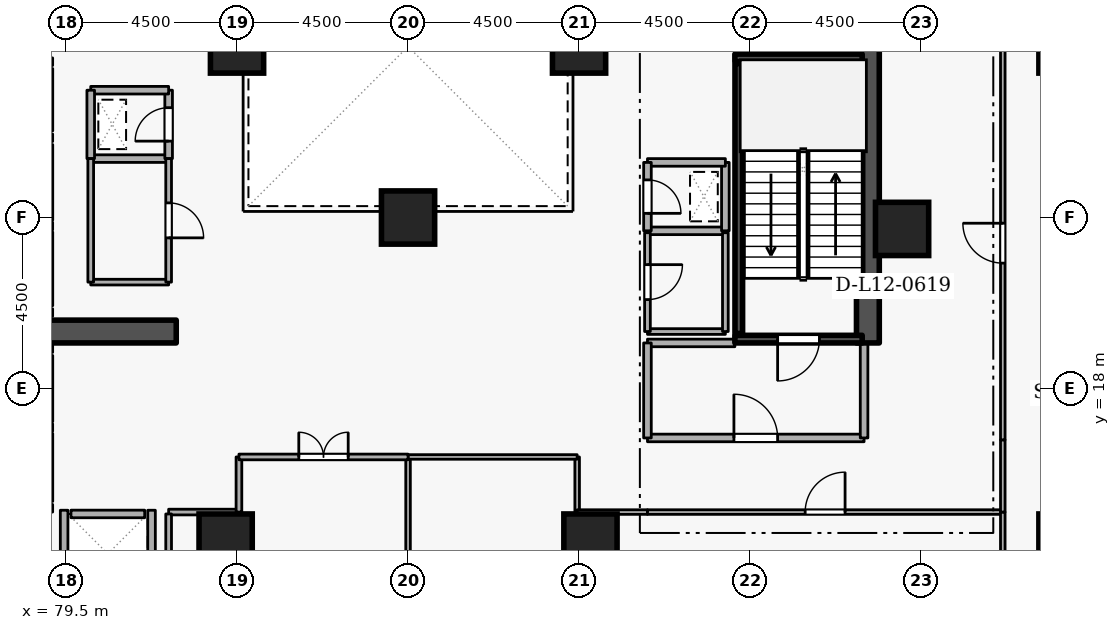
"""IFC4 building model, lengths in metres.
Left out: names, types, materials, properties, quantities, classifications, styles, units other than length and angle.
Written with IfcOpenShell. Run it as: python <this file> out.ifc"""

import sys

from ifc_helpers import new_model, si_unit, direction, frame, frame_2d, origin, origin_2d, place, context, subcontext, project, spatial, rectangle, extrude, element, fill, save


model = new_model("IFC4")
c1 = context("Model", 3, precision=1e-05, world=origin(), true_north=direction((0.0, 1.0)))
c2 = subcontext(c1, "Body", "Model", "MODEL_VIEW")
j1 = project(units=[si_unit("LENGTHUNIT", "METRE"), si_unit("PLANEANGLEUNIT", "RADIAN")], contexts=[c1])
p1 = place(None, origin())
s1 = spatial("IfcSite", under=j1, at=p1, CompositionType="ELEMENT")
p2 = place(p1, origin())
s2 = spatial("IfcBuilding", under=s1, at=p2, CompositionType="ELEMENT")
p3 = place(p2, frame((0.0, 0.0, 49.5)))
s3 = spatial("IfcBuildingStorey", under=s2, at=p3, CompositionType="ELEMENT", Elevation=49.5)
p4 = place(p3, frame((100.6, 19.2, 0.0), z_axis=(0.0, 0.0, 1.0), x_axis=(0.0, 1.0, 0.0)))
e1 = element("IfcWall", 1, at=p4, inside=s3, PredefinedType="SHEAR", context=c2, shape_type="SweptSolid", body=[
    extrude(rectangle(XDim=15.6, YDim=0.6, at=frame_2d((7.8, 0.0))), origin(), (0.0, 0.0, 1.0), 4.2),
])
p5 = place(p3, frame((76.7, 19.5, 0.0), z_axis=(0.0, 0.0, 1.0), x_axis=(1.0, 0.0, 0.0)))
e2 = element("IfcWall", 2, at=p5, inside=s3, PredefinedType="SHEAR", context=c2, shape_type="SweptSolid", body=[
    extrude(rectangle(XDim=5.7, YDim=0.6, at=frame_2d((2.85, 0.0))), origin(), (0.0, 0.0, 1.0), 4.2),
])
for number, where, z_axis, x_axis in (
    (3, (105.8, 14.0, 0.0), (0.0, 0.0, 1.0), (1.0, 0.0, 0.0)),
    (4, (105.8, 27.0, 0.0), (0.0, 0.0, 1.0), (1.0, 0.0, 0.0)),
    (5, (93.3, 14.0, 0.0), (0.0, 0.0, 1.0), (1.0, 0.0, 0.0)),
    (6, (83.7, 14.0, 0.0), (0.0, 0.0, 1.0), (1.0, 0.0, 0.0)),
    (7, (101.5, 22.2, 0.0), (0.0, 0.0, 1.0), (1.0, 0.0, 0.0)),
    (8, (93.0, 27.0, 0.0), (0.0, 0.0, 1.0), (1.0, 0.0, 0.0)),
    (9, (84.0, 27.0, 0.0), (0.0, 0.0, 1.0), (1.0, 0.0, 0.0)),
    (10, (88.5, 22.5, 0.0), (0.0, 0.0, 1.0), (1.0, 0.0, 0.0)),
):
    element("IfcColumn", number, at=place(p3, frame(where, z_axis=z_axis, x_axis=x_axis)), inside=s3, PredefinedType="COLUMN", context=c2, shape_type="SweptSolid", body=[
        extrude(rectangle(XDim=1.4, YDim=1.4, at=origin_2d()), origin(), (0.0, 0.0, 1.0), 4.2),
    ])
p6 = place(p3, frame((79.05, 24.78, 0.0), z_axis=(0.0, 0.0, 1.0), x_axis=(0.0, 1.0, 0.0)))
e11 = element("IfcWall", 11, at=p6, inside=s3, PredefinedType="STANDARD", context=c2, shape_type="SweptSolid", body=[
    extrude(rectangle(XDim=1.64, YDim=0.2, at=frame_2d((0.82, 0.0))), origin(), (0.0, 0.0, 1.0), 3.94),
])
p7 = place(p6, frame((0.31, 0.0, 0.0)))
e12 = element("IfcOpeningElement", 12, at=p7, cuts=e11, PredefinedType="OPENING", context=c2, shape_type="SweptSolid", body=[
    extrude(rectangle(XDim=1.02, YDim=2.06, at=frame_2d((0.51, 1.03))), frame((0.0, 0.11, 0.0), z_axis=(0.0, -1.0, 0.0), x_axis=(1.0, 0.0, 0.0)), (0.0, 0.0, 1.0), 0.22),
])
p8 = place(p3, frame((79.05, 22.43, 0.0), z_axis=(0.0, 0.0, 1.0), x_axis=(0.0, 1.0, 0.0)))
e13 = element("IfcWall", 13, at=p8, inside=s3, PredefinedType="STANDARD", context=c2, shape_type="SweptSolid", body=[
    extrude(rectangle(XDim=1.99, YDim=0.2, at=frame_2d((0.995, 0.0))), origin(), (0.0, 0.0, 1.0), 3.94),
])
p9 = place(p3, frame((79.05, 20.18, 0.0), z_axis=(0.0, 0.0, 1.0), x_axis=(0.0, 1.0, 0.0)))
e14 = element("IfcWall", 14, at=p9, inside=s3, PredefinedType="STANDARD", context=c2, shape_type="SweptSolid", body=[
    extrude(rectangle(XDim=1.94, YDim=0.2, at=frame_2d((0.97, 0.0))), origin(), (0.0, 0.0, 1.0), 3.94),
])
p10 = place(p3, frame((79.05, 17.13, 0.0), z_axis=(0.0, 0.0, 1.0), x_axis=(0.0, 1.0, 0.0)))
e15 = element("IfcWall", 15, at=p10, inside=s3, PredefinedType="STANDARD", context=c2, shape_type="SweptSolid", body=[
    extrude(rectangle(XDim=1.74, YDim=0.2, at=frame_2d((0.87, 0.0))), origin(), (0.0, 0.0, 1.0), 3.94),
])
p11 = place(p3, frame((79.05, 15.03, 0.0), z_axis=(0.0, 0.0, 1.0), x_axis=(0.0, 1.0, 0.0)))
e16 = element("IfcWall", 16, at=p11, inside=s3, PredefinedType="STANDARD", context=c2, shape_type="SweptSolid", body=[
    extrude(rectangle(XDim=1.79, YDim=0.2, at=frame_2d((0.895, 0.0))), origin(), (0.0, 0.0, 1.0), 3.94),
])
p12 = place(p3, frame((79.63, 14.7, 0.0), z_axis=(0.0, 0.0, 1.0), x_axis=(1.0, 0.0, 0.0)))
e17 = element("IfcWall", 17, at=p12, inside=s3, PredefinedType="STANDARD", context=c2, shape_type="SweptSolid", body=[
    extrude(rectangle(XDim=1.94, YDim=0.2, at=frame_2d((0.97, 0.0))), origin(), (0.0, 0.0, 1.0), 3.94),
])
for number, where, z_axis, x_axis in (
    (18, (81.75, 12.612, 0.0), (0.0, 0.0, 1.0), (0.0, 1.0, 0.0)),
    (19, (79.45, 12.612, 0.0), (0.0, 0.0, 1.0), (0.0, 1.0, 0.0)),
):
    element("IfcWall", number, at=place(p3, frame(where, z_axis=z_axis, x_axis=x_axis)), inside=s3, PredefinedType="STANDARD", context=c2, shape_type="SweptSolid", body=[
        extrude(rectangle(XDim=2.186, YDim=0.2, at=frame_2d((1.093, 0.0))), origin(), (0.0, 0.0, 1.0), 3.94),
    ])
p13 = place(p3, frame((100.45, 19.3, 0.0), z_axis=(0.0, 0.0, 1.0), x_axis=(-1.0, 0.0, 0.0)))
e20 = element("IfcWall", 20, at=p13, inside=s3, PredefinedType="SHEAR", context=c2, shape_type="SweptSolid", body=[
    extrude(rectangle(XDim=3.35, YDim=0.2, at=frame_2d((1.675, 0.0))), origin(), (0.0, 0.0, 1.0), 4.2),
])
p14 = place(p13, frame((1.125, 0.0, 0.0)))
e21 = element("IfcOpeningElement", 21, at=p14, cuts=e20, PredefinedType="OPENING", context=c2, shape_type="SweptSolid", body=[
    extrude(rectangle(XDim=1.1, YDim=2.1, at=frame_2d((0.55, 1.05))), frame((0.0, 0.11, 0.0), z_axis=(0.0, -1.0, 0.0), x_axis=(1.0, 0.0, 0.0)), (0.0, 0.0, 1.0), 0.22),
])
p15 = place(p3, frame((97.1, 26.7, 0.0), z_axis=(0.0, 0.0, 1.0), x_axis=(1.0, 0.0, 0.0)))
e22 = element("IfcWall", 22, at=p15, inside=s3, PredefinedType="SHEAR", context=c2, shape_type="SweptSolid", body=[
    extrude(rectangle(XDim=3.35, YDim=0.2, at=frame_2d((1.675, 0.0))), origin(), (0.0, 0.0, 1.0), 4.2),
])
p16 = place(p3, frame((97.203, 26.55, 0.0), z_axis=(0.0, 0.0, 1.0), x_axis=(0.0, -1.0, 0.0)))
e23 = element("IfcWall", 23, at=p16, inside=s3, PredefinedType="SHEAR", context=c2, shape_type="SweptSolid", body=[
    extrude(rectangle(XDim=7.1, YDim=0.2, at=frame_2d((3.55, 0.0))), origin(), (0.0, 0.0, 1.0), 4.2),
])
p17 = place(p3, frame((94.8, 16.7, 0.0), z_axis=(0.0, 0.0, 1.0), x_axis=(1.0, 0.0, 0.0)))
e24 = element("IfcWall", 24, at=p17, inside=s3, PredefinedType="STANDARD", context=c2, shape_type="SweptSolid", body=[
    extrude(rectangle(XDim=5.7, YDim=0.2, at=frame_2d((2.85, 0.0))), origin(), (0.0, 0.0, 1.0), 3.94),
])
p18 = place(p17, frame((2.275, 0.0, 0.0)))
e25 = element("IfcOpeningElement", 25, at=p18, cuts=e24, PredefinedType="OPENING", context=c2, shape_type="SweptSolid", body=[
    extrude(rectangle(XDim=1.15, YDim=2.1, at=frame_2d((0.575, 1.05))), frame((0.0, 0.11, 0.0), z_axis=(0.0, -1.0, 0.0), x_axis=(1.0, 0.0, 0.0)), (0.0, 0.0, 1.0), 0.22),
])
p19 = place(p3, frame((100.5, 16.7, 0.0), z_axis=(0.0, 0.0, 1.0), x_axis=(0.0, 1.0, 0.0)))
e26 = element("IfcWall", 26, at=p19, inside=s3, PredefinedType="STANDARD", context=c2, shape_type="SweptSolid", body=[
    extrude(rectangle(XDim=2.5, YDim=0.2, at=frame_2d((1.25, 0.0))), origin(), (0.0, 0.0, 1.0), 3.94),
])
p20 = place(p3, frame((97.1, 19.2, 0.0), z_axis=(0.0, 0.0, 1.0), x_axis=(-1.0, 0.0, 0.0)))
e27 = element("IfcWall", 27, at=p20, inside=s3, PredefinedType="STANDARD", context=c2, shape_type="SweptSolid", body=[
    extrude(rectangle(XDim=2.3, YDim=0.2, at=frame_2d((1.15, 0.0))), origin(), (0.0, 0.0, 1.0), 3.145),
])
p21 = place(p3, frame((94.8, 19.2, 0.0), z_axis=(0.0, 0.0, 1.0), x_axis=(0.0, -1.0, 0.0)))
e28 = element("IfcWall", 28, at=p21, inside=s3, PredefinedType="STANDARD", context=c2, shape_type="SweptSolid", body=[
    extrude(rectangle(XDim=2.5, YDim=0.2, at=frame_2d((1.25, 0.0))), origin(), (0.0, 0.0, 1.0), 3.94),
])
p22 = place(p3, frame((94.8, 22.15, 0.0), z_axis=(0.0, 0.0, 1.0), x_axis=(1.0, 0.0, 0.0)))
e29 = element("IfcWall", 29, at=p22, inside=s3, PredefinedType="STANDARD", context=c2, shape_type="SweptSolid", body=[
    extrude(rectangle(XDim=2.05, YDim=0.2, at=frame_2d((1.025, 0.0))), origin(), (0.0, 0.0, 1.0), 3.94),
])
p23 = place(p3, frame((96.85, 22.15, 0.0), z_axis=(0.0, 0.0, 1.0), x_axis=(0.0, 1.0, 0.0)))
e30 = element("IfcWall", 30, at=p23, inside=s3, PredefinedType="STANDARD", context=c2, shape_type="SweptSolid", body=[
    extrude(rectangle(XDim=1.8, YDim=0.2, at=frame_2d((0.9, 0.0))), origin(), (0.0, 0.0, 1.0), 3.94),
])
p24 = place(p3, frame((96.85, 23.95, 0.0), z_axis=(0.0, 0.0, 1.0), x_axis=(-1.0, 0.0, 0.0)))
e31 = element("IfcWall", 31, at=p24, inside=s3, PredefinedType="STANDARD", context=c2, shape_type="SweptSolid", body=[
    extrude(rectangle(XDim=2.05, YDim=0.2, at=frame_2d((1.025, 0.0))), origin(), (0.0, 0.0, 1.0), 3.94),
])
p25 = place(p3, frame((94.8, 23.95, 0.0), z_axis=(0.0, 0.0, 1.0), x_axis=(0.0, -1.0, 0.0)))
e32 = element("IfcWall", 32, at=p25, inside=s3, PredefinedType="STANDARD", context=c2, shape_type="SweptSolid", body=[
    extrude(rectangle(XDim=1.8, YDim=0.2, at=frame_2d((0.9, 0.0))), origin(), (0.0, 0.0, 1.0), 3.94),
])
p26 = place(p25, frame((0.46, 0.0, 0.0)))
e33 = element("IfcOpeningElement", 33, at=p26, cuts=e32, PredefinedType="OPENING", context=c2, shape_type="SweptSolid", body=[
    extrude(rectangle(XDim=0.88, YDim=2.04, at=frame_2d((0.44, 1.02))), frame((0.0, 0.11, 0.0), z_axis=(0.0, -1.0, 0.0), x_axis=(1.0, 0.0, 0.0)), (0.0, 0.0, 1.0), 0.22),
])
p27 = place(p3, frame((80.15, 24.05, 0.0), z_axis=(0.0, 0.0, 1.0), x_axis=(1.0, 0.0, 0.0)))
e34 = element("IfcWall", 34, at=p27, inside=s3, PredefinedType="STANDARD", context=c2, shape_type="SweptSolid", body=[
    extrude(rectangle(XDim=2.05, YDim=0.2, at=frame_2d((1.025, 0.0))), origin(), (0.0, 0.0, 1.0), 3.94),
])
p28 = place(p3, frame((82.2, 24.05, 0.0), z_axis=(0.0, 0.0, 1.0), x_axis=(0.0, 1.0, 0.0)))
e35 = element("IfcWall", 35, at=p28, inside=s3, PredefinedType="STANDARD", context=c2, shape_type="SweptSolid", body=[
    extrude(rectangle(XDim=1.8, YDim=0.2, at=frame_2d((0.9, 0.0))), origin(), (0.0, 0.0, 1.0), 3.94),
])
p29 = place(p28, frame((0.46, 0.0, 0.0)))
e36 = element("IfcOpeningElement", 36, at=p29, cuts=e35, PredefinedType="OPENING", context=c2, shape_type="SweptSolid", body=[
    extrude(rectangle(XDim=0.88, YDim=2.04, at=frame_2d((0.44, 1.02))), frame((0.0, 0.11, 0.0), z_axis=(0.0, -1.0, 0.0), x_axis=(1.0, 0.0, 0.0)), (0.0, 0.0, 1.0), 0.22),
])
p30 = place(p3, frame((82.2, 25.85, 0.0), z_axis=(0.0, 0.0, 1.0), x_axis=(-1.0, 0.0, 0.0)))
e37 = element("IfcWall", 37, at=p30, inside=s3, PredefinedType="STANDARD", context=c2, shape_type="SweptSolid", body=[
    extrude(rectangle(XDim=2.05, YDim=0.2, at=frame_2d((1.025, 0.0))), origin(), (0.0, 0.0, 1.0), 3.94),
])
p31 = place(p3, frame((80.15, 25.85, 0.0), z_axis=(0.0, 0.0, 1.0), x_axis=(0.0, -1.0, 0.0)))
e38 = element("IfcWall", 38, at=p31, inside=s3, PredefinedType="STANDARD", context=c2, shape_type="SweptSolid", body=[
    extrude(rectangle(XDim=1.8, YDim=0.2, at=frame_2d((0.9, 0.0))), origin(), (0.0, 0.0, 1.0), 3.94),
])
p32 = place(p3, frame((94.8, 19.5, 0.0), z_axis=(0.0, 0.0, 1.0), x_axis=(1.0, 0.0, 0.0)))
e39 = element("IfcWall", 39, at=p32, inside=s3, PredefinedType="PARTITIONING", context=c2, shape_type="SweptSolid", body=[
    extrude(rectangle(XDim=2.05, YDim=0.15, at=frame_2d((1.025, 0.0))), origin(), (0.0, 0.0, 1.0), 3.145),
])
p33 = place(p3, frame((96.85, 19.5, 0.0), z_axis=(0.0, 0.0, 1.0), x_axis=(0.0, 1.0, 0.0)))
e40 = element("IfcWall", 40, at=p33, inside=s3, PredefinedType="PARTITIONING", context=c2, shape_type="SweptSolid", body=[
    extrude(rectangle(XDim=2.6, YDim=0.15, at=frame_2d((1.3, 0.0))), origin(), (0.0, 0.0, 1.0), 3.94),
])
p34 = place(p3, frame((94.8, 22.1, 0.0), z_axis=(0.0, 0.0, 1.0), x_axis=(0.0, -1.0, 0.0)))
e41 = element("IfcWall", 41, at=p34, inside=s3, PredefinedType="PARTITIONING", context=c2, shape_type="SweptSolid", body=[
    extrude(rectangle(XDim=2.6, YDim=0.15, at=frame_2d((1.3, 0.0))), origin(), (0.0, 0.0, 1.0), 3.94),
])
p35 = place(p34, frame((0.84, 0.0, 0.0)))
e42 = element("IfcOpeningElement", 42, at=p35, cuts=e41, PredefinedType="OPENING", context=c2, shape_type="SweptSolid", body=[
    extrude(rectangle(XDim=0.92, YDim=2.08, at=frame_2d((0.46, 1.04))), frame((0.0, 0.085, 0.0), z_axis=(0.0, -1.0, 0.0), x_axis=(1.0, 0.0, 0.0)), (0.0, 0.0, 1.0), 0.17),
])
p36 = place(p3, frame((82.2, 20.8, 0.0), z_axis=(0.0, 0.0, 1.0), x_axis=(-1.0, 0.0, 0.0)))
e43 = element("IfcWall", 43, at=p36, inside=s3, PredefinedType="PARTITIONING", context=c2, shape_type="SweptSolid", body=[
    extrude(rectangle(XDim=2.05, YDim=0.15, at=frame_2d((1.025, 0.0))), origin(), (0.0, 0.0, 1.0), 3.94),
])
p37 = place(p3, frame((80.15, 20.8, 0.0), z_axis=(0.0, 0.0, 1.0), x_axis=(0.0, 1.0, 0.0)))
e44 = element("IfcWall", 44, at=p37, inside=s3, PredefinedType="PARTITIONING", context=c2, shape_type="SweptSolid", body=[
    extrude(rectangle(XDim=3.25, YDim=0.15, at=frame_2d((1.625, 0.0))), origin(), (0.0, 0.0, 1.0), 3.94),
])
p38 = place(p3, frame((82.2, 24.05, 0.0), z_axis=(0.0, 0.0, 1.0), x_axis=(0.0, -1.0, 0.0)))
e45 = element("IfcWall", 45, at=p38, inside=s3, PredefinedType="PARTITIONING", context=c2, shape_type="SweptSolid", body=[
    extrude(rectangle(XDim=3.25, YDim=0.15, at=frame_2d((1.625, 0.0))), origin(), (0.0, 0.0, 1.0), 3.94),
])
p39 = place(p38, frame((1.165, 0.0, 0.0)))
e46 = element("IfcOpeningElement", 46, at=p39, cuts=e45, PredefinedType="OPENING", context=c2, shape_type="SweptSolid", body=[
    extrude(rectangle(XDim=0.92, YDim=2.08, at=frame_2d((0.46, 1.04))), frame((0.0, 0.085, 0.0), z_axis=(0.0, -1.0, 0.0), x_axis=(1.0, 0.0, 0.0)), (0.0, 0.0, 1.0), 0.17),
])
p40 = place(p3, frame((92.95, 16.2, 0.0), z_axis=(0.0, 0.0, 1.0), x_axis=(0.0, -1.0, 0.0)))
e47 = element("IfcWall", 47, at=p40, inside=s3, PredefinedType="PARTITIONING", context=c2, shape_type="SweptSolid", body=[
    extrude(rectangle(XDim=1.45, YDim=0.12, at=frame_2d((0.725, 0.0))), origin(), (0.0, 0.0, 1.0), 3.94),
])
p41 = place(p3, frame((92.95, 14.75, 0.0), z_axis=(0.0, 0.0, 1.0), x_axis=(1.0, 0.0, 0.0)))
e48 = element("IfcWall", 48, at=p41, inside=s3, PredefinedType="PARTITIONING", context=c2, shape_type="SweptSolid", body=[
    extrude(rectangle(XDim=1.85, YDim=0.12, at=frame_2d((0.925, 0.0))), origin(), (0.0, 0.0, 1.0), 3.94),
])
p42 = place(p3, frame((94.8, 14.75, 0.0), z_axis=(0.0, 0.0, 1.0), x_axis=(1.0, 0.0, 0.0)))
e49 = element("IfcWall", 49, at=p42, inside=s3, PredefinedType="PARTITIONING", context=c2, shape_type="SweptSolid", body=[
    extrude(rectangle(XDim=9.35, YDim=0.12, at=frame_2d((4.675, 0.0))), origin(), (0.0, 0.0, 1.0), 3.94),
])
p43 = place(p42, frame((4.15, 0.0, 0.0)))
e50 = element("IfcOpeningElement", 50, at=p43, cuts=e49, PredefinedType="OPENING", context=c2, shape_type="SweptSolid", body=[
    extrude(rectangle(XDim=1.05, YDim=2.1, at=frame_2d((0.525, 1.05))), frame((0.0, 0.07, 0.0), z_axis=(0.0, -1.0, 0.0), x_axis=(1.0, 0.0, 0.0)), (0.0, 0.0, 1.0), 0.14),
])
p44 = place(p3, frame((104.15, 14.75, 0.0), z_axis=(0.0, 0.0, 1.0), x_axis=(0.0, -1.0, 0.0)))
e51 = element("IfcWall", 51, at=p44, inside=s3, PredefinedType="PARTITIONING", context=c2, shape_type="SweptSolid", body=[
    extrude(rectangle(XDim=5.97, YDim=0.12, at=frame_2d((2.985, 0.0))), origin(), (0.0, 0.0, 1.0), 3.94),
])
p45 = place(p3, frame((88.5, 8.78, 0.0), z_axis=(0.0, 0.0, 1.0), x_axis=(0.0, 1.0, 0.0)))
e52 = element("IfcWall", 52, at=p45, inside=s3, PredefinedType="PARTITIONING", context=c2, shape_type="SweptSolid", body=[
    extrude(rectangle(XDim=7.42, YDim=0.12, at=frame_2d((3.71, 0.0))), origin(), (0.0, 0.0, 1.0), 3.532),
])
p46 = place(p3, frame((88.5, 16.2, 0.0), z_axis=(0.0, 0.0, 1.0), x_axis=(1.0, 0.0, 0.0)))
e53 = element("IfcWall", 53, at=p46, inside=s3, PredefinedType="PARTITIONING", context=c2, shape_type="SweptSolid", body=[
    extrude(rectangle(XDim=4.45, YDim=0.12, at=frame_2d((2.225, 0.0))), origin(), (0.0, 0.0, 1.0), 3.94),
])
p47 = place(p3, frame((82.2, 14.75, 0.0), z_axis=(0.0, 0.0, 1.0), x_axis=(1.0, 0.0, 0.0)))
e54 = element("IfcWall", 54, at=p47, inside=s3, PredefinedType="PARTITIONING", context=c2, shape_type="SweptSolid", body=[
    extrude(rectangle(XDim=1.85, YDim=0.15, at=frame_2d((0.925, 0.0))), origin(), (0.0, 0.0, 1.0), 3.94),
])
p48 = place(p3, frame((84.05, 14.75, 0.0), z_axis=(0.0, 0.0, 1.0), x_axis=(0.0, 1.0, 0.0)))
e55 = element("IfcWall", 55, at=p48, inside=s3, PredefinedType="PARTITIONING", context=c2, shape_type="SweptSolid", body=[
    extrude(rectangle(XDim=1.45, YDim=0.15, at=frame_2d((0.725, 0.0))), origin(), (0.0, 0.0, 1.0), 3.94),
])
p49 = place(p3, frame((84.05, 16.2, 0.0), z_axis=(0.0, 0.0, 1.0), x_axis=(1.0, 0.0, 0.0)))
e56 = element("IfcWall", 56, at=p49, inside=s3, PredefinedType="PARTITIONING", context=c2, shape_type="SweptSolid", body=[
    extrude(rectangle(XDim=4.45, YDim=0.15, at=frame_2d((2.225, 0.0))), origin(), (0.0, 0.0, 1.0), 3.94),
])
p50 = place(p49, frame((1.575, 0.0, 0.0)))
e57 = element("IfcOpeningElement", 57, at=p50, cuts=e56, PredefinedType="OPENING", context=c2, shape_type="SweptSolid", body=[
    extrude(rectangle(XDim=1.3, YDim=2.12, at=frame_2d((0.65, 1.06))), frame((0.0, 0.085, 0.0), z_axis=(0.0, -1.0, 0.0), x_axis=(1.0, 0.0, 0.0)), (0.0, 0.0, 1.0), 0.17),
])
p51 = place(p3, frame((82.2, 12.4, 0.0), z_axis=(0.0, 0.0, 1.0), x_axis=(0.0, 1.0, 0.0)))
e58 = element("IfcWall", 58, at=p51, inside=s3, PredefinedType="PARTITIONING", context=c2, shape_type="SweptSolid", body=[
    extrude(rectangle(XDim=2.3, YDim=0.15, at=frame_2d((1.15, 0.0))), origin(), (0.0, 0.0, 1.0), 3.94),
])
p52 = place(p3, frame((104.15, 14.75, 0.0), z_axis=(0.0, 0.0, 1.0), x_axis=(0.0, 1.0, 0.0)))
e59 = element("IfcWall", 59, at=p52, inside=s3, PredefinedType="PARTITIONING", context=c2, shape_type="SweptSolid", body=[
    extrude(rectangle(XDim=1.9, YDim=0.12, at=frame_2d((0.95, 0.0))), origin(), (0.0, 0.0, 1.0), 3.94),
])
p53 = place(p3, frame((104.15, 16.65, 0.0), z_axis=(0.0, 0.0, 1.0), x_axis=(0.0, 1.0, 0.0)))
e60 = element("IfcWall", 60, at=p53, inside=s3, PredefinedType="PARTITIONING", context=c2, shape_type="SweptSolid", body=[
    extrude(rectangle(XDim=10.35, YDim=0.12, at=frame_2d((5.175, 0.0))), origin(), (0.0, 0.0, 1.0), 3.94),
])
p54 = place(p53, frame((4.65, 0.0, 0.0)))
e61 = element("IfcOpeningElement", 61, at=p54, cuts=e60, PredefinedType="OPENING", context=c2, shape_type="SweptSolid", body=[
    extrude(rectangle(XDim=1.05, YDim=2.1, at=frame_2d((0.525, 1.05))), frame((0.0, 0.07, 0.0), z_axis=(0.0, -1.0, 0.0), x_axis=(1.0, 0.0, 0.0)), (0.0, 0.0, 1.0), 0.14),
])
p55 = place(p14, origin())
e62 = element("IfcDoor", 62, at=p55, inside=s3, OperationType="SINGLE_SWING_RIGHT", PredefinedType="DOOR", context=c2, shape_type="SweptSolid", body=[
    extrude(rectangle(XDim=1.1, YDim=2.1, at=frame_2d((0.55, 1.05))), frame((0.0, 0.025, 0.0), z_axis=(0.0, -1.0, 0.0), x_axis=(1.0, 0.0, 0.0)), (0.0, 0.0, 1.0), 0.05),
])
fill(e21, e62)
p56 = place(p18, origin())
e63 = element("IfcDoor", 63, at=p56, inside=s3, OperationType="SINGLE_SWING_LEFT", PredefinedType="DOOR", context=c2, shape_type="SweptSolid", body=[
    extrude(rectangle(XDim=1.15, YDim=2.1, at=frame_2d((0.575, 1.05))), frame((0.0, 0.025, 0.0), z_axis=(0.0, -1.0, 0.0), x_axis=(1.0, 0.0, 0.0)), (0.0, 0.0, 1.0), 0.05),
])
fill(e25, e63)
p57 = place(p26, origin())
e64 = element("IfcDoor", 64, at=p57, inside=s3, OperationType="SINGLE_SWING_RIGHT", PredefinedType="DOOR", context=c2, shape_type="SweptSolid", body=[
    extrude(rectangle(XDim=0.88, YDim=2.04, at=frame_2d((0.44, 1.02))), frame((0.0, 0.025, 0.0), z_axis=(0.0, -1.0, 0.0), x_axis=(1.0, 0.0, 0.0)), (0.0, 0.0, 1.0), 0.05),
])
fill(e33, e64)
p58 = place(p29, origin())
e65 = element("IfcDoor", 65, at=p58, inside=s3, OperationType="SINGLE_SWING_LEFT", PredefinedType="DOOR", context=c2, shape_type="SweptSolid", body=[
    extrude(rectangle(XDim=0.88, YDim=2.04, at=frame_2d((0.44, 1.02))), frame((0.0, 0.025, 0.0), z_axis=(0.0, -1.0, 0.0), x_axis=(1.0, 0.0, 0.0)), (0.0, 0.0, 1.0), 0.05),
])
fill(e36, e65)
p59 = place(p35, origin())
e66 = element("IfcDoor", 66, at=p59, inside=s3, OperationType="SINGLE_SWING_LEFT", PredefinedType="DOOR", context=c2, shape_type="SweptSolid", body=[
    extrude(rectangle(XDim=0.92, YDim=2.08, at=frame_2d((0.46, 1.04))), frame((0.0, 0.025, 0.0), z_axis=(0.0, -1.0, 0.0), x_axis=(1.0, 0.0, 0.0)), (0.0, 0.0, 1.0), 0.05),
])
fill(e42, e66)
p60 = place(p39, origin())
e67 = element("IfcDoor", 67, at=p60, inside=s3, OperationType="SINGLE_SWING_RIGHT", PredefinedType="DOOR", context=c2, shape_type="SweptSolid", body=[
    extrude(rectangle(XDim=0.92, YDim=2.08, at=frame_2d((0.46, 1.04))), frame((0.0, 0.025, 0.0), z_axis=(0.0, -1.0, 0.0), x_axis=(1.0, 0.0, 0.0)), (0.0, 0.0, 1.0), 0.05),
])
fill(e46, e67)
p61 = place(p43, origin())
e68 = element("IfcDoor", 68, at=p61, inside=s3, OperationType="SINGLE_SWING_RIGHT", PredefinedType="DOOR", context=c2, shape_type="SweptSolid", body=[
    extrude(rectangle(XDim=1.05, YDim=2.1, at=frame_2d((0.525, 1.05))), frame((0.0, 0.025, 0.0), z_axis=(0.0, -1.0, 0.0), x_axis=(1.0, 0.0, 0.0)), (0.0, 0.0, 1.0), 0.05),
])
fill(e50, e68)
p62 = place(p50, origin())
e69 = element("IfcDoor", 69, at=p62, inside=s3, OperationType="DOUBLE_DOOR_SINGLE_SWING", PredefinedType="DOOR", context=c2, shape_type="SweptSolid", body=[
    extrude(rectangle(XDim=1.3, YDim=2.12, at=frame_2d((0.65, 1.06))), frame((0.0, 0.025, 0.0), z_axis=(0.0, -1.0, 0.0), x_axis=(1.0, 0.0, 0.0)), (0.0, 0.0, 1.0), 0.05),
])
fill(e57, e69)
p63 = place(p54, origin())
e70 = element("IfcDoor", 70, at=p63, inside=s3, OperationType="SINGLE_SWING_RIGHT", PredefinedType="DOOR", context=c2, shape_type="SweptSolid", body=[
    extrude(rectangle(XDim=1.05, YDim=2.1, at=frame_2d((0.525, 1.05))), frame((0.0, 0.025, 0.0), z_axis=(0.0, -1.0, 0.0), x_axis=(1.0, 0.0, 0.0)), (0.0, 0.0, 1.0), 0.05),
])
fill(e61, e70)
save(model, sys.argv[1])
